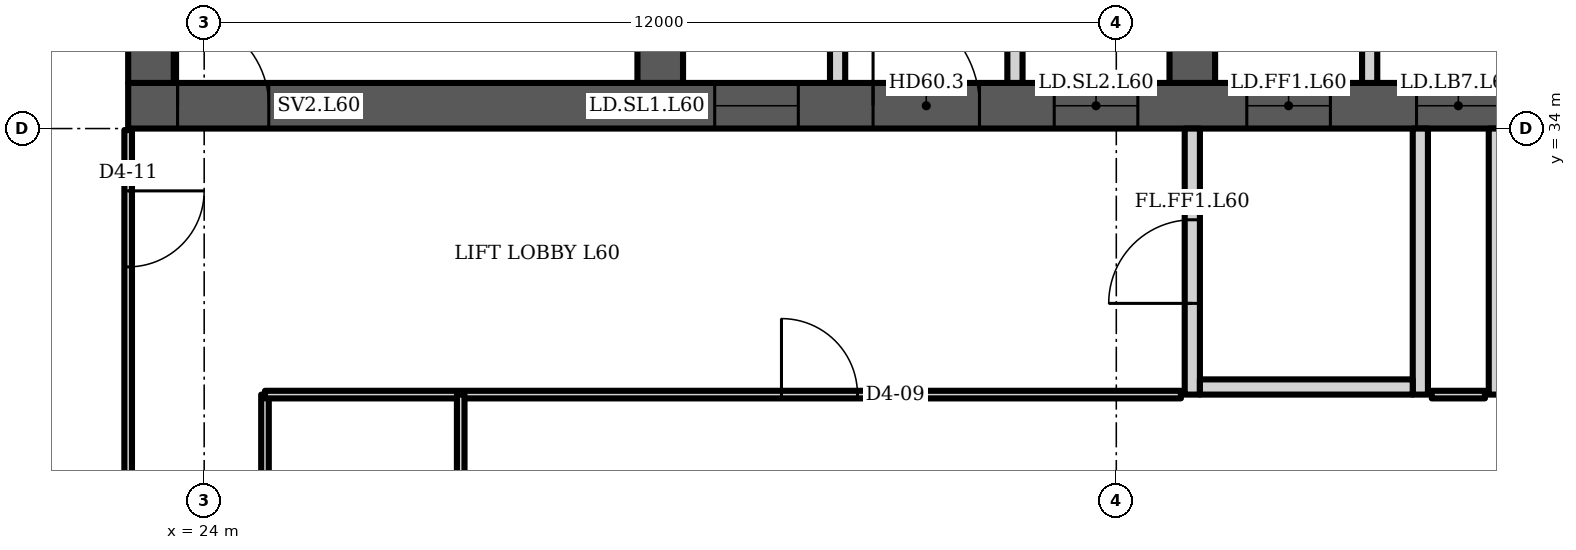
"""IFC4 building model, lengths in metres.
Left out: names, types, materials, properties, quantities, classifications, styles, units other than length and angle.
Written with IfcOpenShell. Run it as: python <this file> out.ifc"""

import sys

from ifc_helpers import new_model, si_unit, direction, frame, frame_2d, origin, place, context, subcontext, project, spatial, polyline, rectangle, outline, extrude, element, fill, save


model = new_model("IFC4")
c1 = context("Model", 3, precision=1e-05, world=origin(), true_north=direction((0.0, 1.0)))
c2 = subcontext(c1, "Body", "Model", "MODEL_VIEW")
j1 = project(units=[si_unit("LENGTHUNIT", "METRE"), si_unit("PLANEANGLEUNIT", "RADIAN")], contexts=[c1])
p1 = place(None, origin())
s1 = spatial("IfcSite", under=j1, at=p1, CompositionType="ELEMENT")
p2 = place(p1, origin())
s2 = spatial("IfcBuilding", under=s1, at=p2, CompositionType="ELEMENT")
p3 = place(p2, frame((0.0, 0.0, 239.5)))
s3 = spatial("IfcBuildingStorey", under=s2, at=p3, CompositionType="ELEMENT", Elevation=239.5)
p4 = place(p3, frame((23.0, 34.3, 0.0), z_axis=(0.0, 0.0, 1.0), x_axis=(1.0, 0.0, 0.0)))
e1 = element("IfcWall", 1, at=p4, inside=s3, PredefinedType="SHEAR", context=c2, shape_type="SweptSolid", body=[
    extrude(rectangle(XDim=35.0, YDim=0.6, at=frame_2d((17.5, 0.0))), origin(), (0.0, 0.0, 1.0), 3.6),
])
p5 = place(p4, frame((0.65, 0.0, 0.0)))
e2 = element("IfcOpeningElement", 2, at=p5, cuts=e1, PredefinedType="OPENING", context=c2, shape_type="SweptSolid", body=[
    extrude(rectangle(XDim=1.2, YDim=2.1, at=frame_2d((0.6, 1.05))), frame((0.0, 0.31, 0.0), z_axis=(0.0, -1.0, 0.0), x_axis=(1.0, 0.0, 0.0)), (0.0, 0.0, 1.0), 0.62),
])
p6 = place(p4, frame((7.717, 0.0, 0.0)))
e3 = element("IfcOpeningElement", 3, at=p6, cuts=e1, PredefinedType="OPENING", context=c2, shape_type="SweptSolid", body=[
    extrude(rectangle(XDim=1.1, YDim=2.1, at=frame_2d((0.55, 1.05))), frame((0.0, 0.31, 0.0), z_axis=(0.0, -1.0, 0.0), x_axis=(1.0, 0.0, 0.0)), (0.0, 0.0, 1.0), 0.62),
])
p7 = place(p4, frame((12.183, 0.0, 0.0)))
e4 = element("IfcOpeningElement", 4, at=p7, cuts=e1, PredefinedType="OPENING", context=c2, shape_type="SweptSolid", body=[
    extrude(rectangle(XDim=1.1, YDim=2.1, at=frame_2d((0.55, 1.05))), frame((0.0, 0.31, 0.0), z_axis=(0.0, -1.0, 0.0), x_axis=(1.0, 0.0, 0.0)), (0.0, 0.0, 1.0), 0.62),
])
p8 = place(p4, frame((9.8, 0.0, 0.0)))
e5 = element("IfcOpeningElement", 5, at=p8, cuts=e1, PredefinedType="OPENING", context=c2, shape_type="SweptSolid", body=[
    extrude(rectangle(XDim=1.4, YDim=2.1, at=frame_2d((0.7, 1.05))), frame((0.0, 0.31, 0.0), z_axis=(0.0, -1.0, 0.0), x_axis=(1.0, 0.0, 0.0)), (0.0, 0.0, 1.0), 0.62),
])
p9 = place(p4, frame((14.717, 0.0, 0.0)))
e6 = element("IfcOpeningElement", 6, at=p9, cuts=e1, PredefinedType="OPENING", context=c2, shape_type="SweptSolid", body=[
    extrude(rectangle(XDim=1.1, YDim=2.1, at=frame_2d((0.55, 1.05))), frame((0.0, 0.31, 0.0), z_axis=(0.0, -1.0, 0.0), x_axis=(1.0, 0.0, 0.0)), (0.0, 0.0, 1.0), 0.62),
])
p10 = place(p4, frame((16.95, 0.0, 0.0)))
e7 = element("IfcOpeningElement", 7, at=p10, cuts=e1, PredefinedType="OPENING", context=c2, shape_type="SweptSolid", body=[
    extrude(rectangle(XDim=1.1, YDim=2.1, at=frame_2d((0.55, 1.05))), frame((0.0, 0.31, 0.0), z_axis=(0.0, -1.0, 0.0), x_axis=(1.0, 0.0, 0.0)), (0.0, 0.0, 1.0), 0.62),
])
p11 = place(p4, frame((19.183, 0.0, 0.0)))
e8 = element("IfcOpeningElement", 8, at=p11, cuts=e1, PredefinedType="OPENING", context=c2, shape_type="SweptSolid", body=[
    extrude(rectangle(XDim=1.1, YDim=2.1, at=frame_2d((0.55, 1.05))), frame((0.0, 0.31, 0.0), z_axis=(0.0, -1.0, 0.0), x_axis=(1.0, 0.0, 0.0)), (0.0, 0.0, 1.0), 0.62),
])
p12 = place(p4, frame((26.15, 0.0, 0.0)))
e9 = element("IfcOpeningElement", 9, at=p12, cuts=e1, PredefinedType="OPENING", context=c2, shape_type="SweptSolid", body=[
    extrude(rectangle(XDim=1.2, YDim=2.1, at=frame_2d((0.6, 1.05))), frame((0.0, 0.31, 0.0), z_axis=(0.0, -1.0, 0.0), x_axis=(1.0, 0.0, 0.0)), (0.0, 0.0, 1.0), 0.62),
])
p13 = place(p4, frame((28.767, 0.0, 0.0)))
e10 = element("IfcOpeningElement", 10, at=p13, cuts=e1, PredefinedType="OPENING", context=c2, shape_type="SweptSolid", body=[
    extrude(rectangle(XDim=1.0, YDim=2.1, at=frame_2d((0.5, 1.05))), frame((0.0, 0.31, 0.0), z_axis=(0.0, -1.0, 0.0), x_axis=(1.0, 0.0, 0.0)), (0.0, 0.0, 1.0), 0.62),
])
p14 = place(p4, frame((33.083, 0.0, 0.0)))
e11 = element("IfcOpeningElement", 11, at=p14, cuts=e1, PredefinedType="OPENING", context=c2, shape_type="SweptSolid", body=[
    extrude(rectangle(XDim=1.0, YDim=2.1, at=frame_2d((0.5, 1.05))), frame((0.0, 0.31, 0.0), z_axis=(0.0, -1.0, 0.0), x_axis=(1.0, 0.0, 0.0)), (0.0, 0.0, 1.0), 0.62),
])
p15 = place(p4, frame((30.8, 0.0, 0.0)))
e12 = element("IfcOpeningElement", 12, at=p15, cuts=e1, PredefinedType="OPENING", context=c2, shape_type="SweptSolid", body=[
    extrude(rectangle(XDim=1.4, YDim=2.1, at=frame_2d((0.7, 1.05))), frame((0.0, 0.31, 0.0), z_axis=(0.0, -1.0, 0.0), x_axis=(1.0, 0.0, 0.0)), (0.0, 0.0, 1.0), 0.62),
])
p16 = place(p3, frame((23.3, 34.6, 0.0), z_axis=(0.0, 0.0, 1.0), x_axis=(0.0, 1.0, 0.0)))
e13 = element("IfcWall", 13, at=p16, inside=s3, PredefinedType="SHEAR", context=c2, shape_type="SweptSolid", body=[
    extrude(rectangle(XDim=13.585, YDim=0.6, at=frame_2d((6.792, 0.0))), origin(), (0.0, 0.0, 1.0), 3.6),
])
p17 = place(p3, frame((30.0, 34.6, 0.0), z_axis=(0.0, 0.0, 1.0), x_axis=(0.0, 1.0, 0.0)))
e14 = element("IfcWall", 14, at=p17, inside=s3, PredefinedType="SHEAR", context=c2, shape_type="SweptSolid", body=[
    extrude(rectangle(XDim=14.171, YDim=0.6, at=frame_2d((7.085, 0.0))), origin(), (0.0, 0.0, 1.0), 3.6),
])
p18 = place(p17, frame((3.8, 0.0, 0.0)))
e15 = element("IfcOpeningElement", 15, at=p18, cuts=e14, PredefinedType="OPENING", context=c2, shape_type="SweptSolid", body=[
    extrude(rectangle(XDim=1.1, YDim=2.1, at=frame_2d((0.55, 1.05))), frame((0.0, 0.31, 0.0), z_axis=(0.0, -1.0, 0.0), x_axis=(1.0, 0.0, 0.0)), (0.0, 0.0, 1.0), 0.62),
])
p19 = place(p3, frame((37.0, 34.6, 0.0), z_axis=(0.0, 0.0, 1.0), x_axis=(0.0, 1.0, 0.0)))
e16 = element("IfcWall", 16, at=p19, inside=s3, PredefinedType="SHEAR", context=c2, shape_type="SweptSolid", body=[
    extrude(rectangle(XDim=14.784, YDim=0.6, at=frame_2d((7.392, 0.0))), origin(), (0.0, 0.0, 1.0), 3.6),
])
p20 = place(p19, frame((11.302, 0.0, 0.0)))
e17 = element("IfcOpeningElement", 17, at=p20, cuts=e16, PredefinedType="OPENING", context=c2, shape_type="SweptSolid", body=[
    extrude(rectangle(XDim=1.0, YDim=2.1, at=frame_2d((0.5, 1.05))), frame((0.0, 0.31, 0.0), z_axis=(0.0, -1.0, 0.0), x_axis=(1.0, 0.0, 0.0)), (0.0, 0.0, 1.0), 0.62),
])
p21 = place(p19, frame((3.8, 0.0, 0.0)))
e18 = element("IfcOpeningElement", 18, at=p21, cuts=e16, PredefinedType="OPENING", context=c2, shape_type="SweptSolid", body=[
    extrude(rectangle(XDim=1.1, YDim=2.1, at=frame_2d((0.55, 1.05))), frame((0.0, 0.31, 0.0), z_axis=(0.0, -1.0, 0.0), x_axis=(1.0, 0.0, 0.0)), (0.0, 0.0, 1.0), 0.62),
])
p22 = place(p3, frame((0.0, 0.0, -0.0)))
e19 = element("IfcWall", 19, at=p22, inside=s3, PredefinedType="PARTITIONING", context=c2, shape_type="SweptSolid", body=[
    extrude(outline(polyline([(32.233, 37.45), (30.3, 37.45), (30.3, 37.65), (32.233, 37.65), (32.433, 37.65), (32.433, 34.6), (32.233, 34.6), (32.233, 37.45)])), origin(), (0.0, 0.0, 1.0), 3.2),
])
p23 = place(p3, frame((0.0, 0.0, -0.0)))
e20 = element("IfcWall", 20, at=p23, inside=s3, PredefinedType="PARTITIONING", context=c2, shape_type="SweptSolid", body=[
    extrude(outline(polyline([(34.567, 37.65), (34.767, 37.65), (36.7, 37.65), (36.7, 37.45), (34.767, 37.45), (34.767, 34.6), (34.567, 34.6), (34.567, 37.65)])), origin(), (0.0, 0.0, 1.0), 3.2),
])
p24 = place(p3, frame((0.0, 0.0, -0.0)))
e21 = element("IfcWall", 21, at=p24, inside=s3, PredefinedType="PARTITIONING", context=c2, shape_type="SweptSolid", body=[
    extrude(outline(polyline([(41.567, 37.1), (39.433, 37.1), (39.433, 34.6), (39.233, 34.6), (39.233, 37.45), (37.3, 37.45), (37.3, 37.65), (39.233, 37.65), (39.433, 37.65), (39.433, 37.3), (41.567, 37.3), (41.567, 37.35), (41.767, 37.35), (43.7, 37.35), (43.7, 37.15), (41.767, 37.15), (41.767, 34.6), (41.567, 34.6), (41.567, 37.1)])), origin(), (0.0, 0.0, 1.0), 3.2),
])
p25 = place(p3, frame((37.0, 30.5, 0.0), z_axis=(0.0, 0.0, 1.0), x_axis=(0.0, 1.0, 0.0)))
e22 = element("IfcWall", 22, at=p25, inside=s3, PredefinedType="PARTITIONING", context=c2, shape_type="SweptSolid", body=[
    extrude(rectangle(XDim=3.5, YDim=0.2, at=frame_2d((1.75, 0.0))), origin(), (0.0, 0.0, 1.0), 3.2),
])
p26 = place(p25, frame((1.2, 0.0, 0.0)))
e23 = element("IfcOpeningElement", 23, at=p26, cuts=e22, PredefinedType="OPENING", context=c2, shape_type="SweptSolid", body=[
    extrude(rectangle(XDim=1.1, YDim=2.1, at=frame_2d((0.55, 1.05))), frame((0.0, 0.11, 0.0), z_axis=(0.0, -1.0, 0.0), x_axis=(1.0, 0.0, 0.0)), (0.0, 0.0, 1.0), 0.22),
])
p27 = place(p3, frame((40.0, 30.5, 0.0), z_axis=(0.0, 0.0, 1.0), x_axis=(0.0, 1.0, 0.0)))
e24 = element("IfcWall", 24, at=p27, inside=s3, PredefinedType="PARTITIONING", context=c2, shape_type="SweptSolid", body=[
    extrude(rectangle(XDim=3.5, YDim=0.2, at=frame_2d((1.75, 0.0))), origin(), (0.0, 0.0, 1.0), 3.2),
])
p28 = place(p3, frame((37.1, 30.6, 0.0), z_axis=(0.0, 0.0, 1.0), x_axis=(1.0, 0.0, 0.0)))
e25 = element("IfcWall", 25, at=p28, inside=s3, PredefinedType="PARTITIONING", context=c2, shape_type="SweptSolid", body=[
    extrude(rectangle(XDim=2.8, YDim=0.2, at=frame_2d((1.4, 0.0))), origin(), (0.0, 0.0, 1.0), 3.2),
])
p29 = place(p3, frame((41.0, 30.5, 0.0), z_axis=(0.0, 0.0, 1.0), x_axis=(0.0, 1.0, 0.0)))
e26 = element("IfcWall", 26, at=p29, inside=s3, PredefinedType="PARTITIONING", context=c2, shape_type="SweptSolid", body=[
    extrude(rectangle(XDim=3.5, YDim=0.2, at=frame_2d((1.75, 0.0))), origin(), (0.0, 0.0, 1.0), 3.2),
])
p30 = place(p3, frame((23.0, 24.275, 0.0), z_axis=(0.0, 0.0, 1.0), x_axis=(0.0, 1.0, 0.0)))
e27 = element("IfcWall", 27, at=p30, inside=s3, PredefinedType="PARTITIONING", context=c2, shape_type="SweptSolid", body=[
    extrude(rectangle(XDim=9.705, YDim=0.1, at=frame_2d((4.853, 0.0))), origin(), (0.0, 0.0, 1.0), 3.2),
])
p31 = place(p30, frame((7.905, 0.0, 0.0)))
e28 = element("IfcOpeningElement", 28, at=p31, cuts=e27, PredefinedType="OPENING", context=c2, shape_type="SweptSolid", body=[
    extrude(rectangle(XDim=1.0, YDim=2.1, at=frame_2d((0.5, 1.05))), frame((0.0, 0.06, 0.0), z_axis=(0.0, -1.0, 0.0), x_axis=(1.0, 0.0, 0.0)), (0.0, 0.0, 1.0), 0.12),
])
p32 = place(p3, frame((24.8, 25.05, 0.0), z_axis=(0.0, 0.0, 1.0), x_axis=(0.0, 1.0, 0.0)))
e29 = element("IfcWall", 29, at=p32, inside=s3, PredefinedType="PARTITIONING", context=c2, shape_type="SweptSolid", body=[
    extrude(rectangle(XDim=5.45, YDim=0.1, at=frame_2d((2.725, 0.0))), origin(), (0.0, 0.0, 1.0), 3.2),
])
p33 = place(p32, frame((1.537, 0.0, 0.0)))
e30 = element("IfcOpeningElement", 30, at=p33, cuts=e29, PredefinedType="OPENING", context=c2, shape_type="SweptSolid", body=[
    extrude(rectangle(XDim=1.0, YDim=2.1, at=frame_2d((0.5, 1.05))), frame((0.0, 0.06, 0.0), z_axis=(0.0, -1.0, 0.0), x_axis=(1.0, 0.0, 0.0)), (0.0, 0.0, 1.0), 0.12),
])
p34 = place(p3, frame((24.8, 30.5, 0.0), z_axis=(0.0, 0.0, 1.0), x_axis=(1.0, 0.0, 0.0)))
e31 = element("IfcWall", 31, at=p34, inside=s3, PredefinedType="PARTITIONING", context=c2, shape_type="SweptSolid", body=[
    extrude(rectangle(XDim=12.05, YDim=0.1, at=frame_2d((6.025, 0.0))), origin(), (0.0, 0.0, 1.0), 3.2),
])
p35 = place(p34, frame((6.795, 0.0, 0.0)))
e32 = element("IfcOpeningElement", 32, at=p35, cuts=e31, PredefinedType="OPENING", context=c2, shape_type="SweptSolid", body=[
    extrude(rectangle(XDim=1.0, YDim=2.1, at=frame_2d((0.5, 1.05))), frame((0.0, 0.06, 0.0), z_axis=(0.0, -1.0, 0.0), x_axis=(1.0, 0.0, 0.0)), (0.0, 0.0, 1.0), 0.12),
])
p36 = place(p3, frame((27.375, 5.915, 0.0), z_axis=(0.0, 0.0, 1.0), x_axis=(0.0, 1.0, 0.0)))
e33 = element("IfcWall", 33, at=p36, inside=s3, PredefinedType="PARTITIONING", context=c2, shape_type="SweptSolid", body=[
    extrude(rectangle(XDim=24.585, YDim=0.1, at=frame_2d((12.292, 0.0))), origin(), (0.0, 0.0, 1.0), 3.2),
])
p37 = place(p3, frame((40.15, 30.5, 0.0), z_axis=(0.0, 0.0, 1.0), x_axis=(1.0, 0.0, 0.0)))
e34 = element("IfcWall", 34, at=p37, inside=s3, PredefinedType="PARTITIONING", context=c2, shape_type="SweptSolid", body=[
    extrude(rectangle(XDim=0.7, YDim=0.1, at=frame_2d((0.35, 0.0))), origin(), (0.0, 0.0, 1.0), 3.2),
])
p38 = place(p5, origin())
e35 = element("IfcDoor", 35, at=p38, inside=s3, OperationType="SINGLE_SWING_LEFT", PredefinedType="DOOR", context=c2, shape_type="SweptSolid", body=[
    extrude(rectangle(XDim=1.2, YDim=2.1, at=frame_2d((0.6, 1.05))), frame((0.0, 0.025, 0.0), z_axis=(0.0, -1.0, 0.0), x_axis=(1.0, 0.0, 0.0)), (0.0, 0.0, 1.0), 0.05),
])
fill(e2, e35)
p39 = place(p6, origin())
e36 = element("IfcDoor", 36, at=p39, inside=s3, OperationType="DOUBLE_DOOR_SLIDING", PredefinedType="DOOR", context=c2, shape_type="SweptSolid", body=[
    extrude(rectangle(XDim=1.1, YDim=2.1, at=frame_2d((0.55, 1.05))), frame((0.0, 0.025, 0.0), z_axis=(0.0, -1.0, 0.0), x_axis=(1.0, 0.0, 0.0)), (0.0, 0.0, 1.0), 0.05),
])
fill(e3, e36)
p40 = place(p7, origin())
e37 = element("IfcDoor", 37, at=p40, inside=s3, OperationType="DOUBLE_DOOR_SLIDING", PredefinedType="DOOR", context=c2, shape_type="SweptSolid", body=[
    extrude(rectangle(XDim=1.1, YDim=2.1, at=frame_2d((0.55, 1.05))), frame((0.0, 0.025, 0.0), z_axis=(0.0, -1.0, 0.0), x_axis=(1.0, 0.0, 0.0)), (0.0, 0.0, 1.0), 0.05),
])
fill(e4, e37)
p41 = place(p8, origin())
e38 = element("IfcDoor", 38, at=p41, inside=s3, OperationType="DOUBLE_DOOR_SINGLE_SWING", PredefinedType="DOOR", context=c2, shape_type="SweptSolid", body=[
    extrude(rectangle(XDim=1.4, YDim=2.1, at=frame_2d((0.7, 1.05))), frame((0.0, 0.025, 0.0), z_axis=(0.0, -1.0, 0.0), x_axis=(1.0, 0.0, 0.0)), (0.0, 0.0, 1.0), 0.05),
])
fill(e5, e38)
p42 = place(p9, origin())
e39 = element("IfcDoor", 39, at=p42, inside=s3, OperationType="DOUBLE_DOOR_SLIDING", PredefinedType="DOOR", context=c2, shape_type="SweptSolid", body=[
    extrude(rectangle(XDim=1.1, YDim=2.1, at=frame_2d((0.55, 1.05))), frame((0.0, 0.025, 0.0), z_axis=(0.0, -1.0, 0.0), x_axis=(1.0, 0.0, 0.0)), (0.0, 0.0, 1.0), 0.05),
])
fill(e6, e39)
p43 = place(p10, origin())
e40 = element("IfcDoor", 40, at=p43, inside=s3, OperationType="DOUBLE_DOOR_SLIDING", PredefinedType="DOOR", context=c2, shape_type="SweptSolid", body=[
    extrude(rectangle(XDim=1.1, YDim=2.1, at=frame_2d((0.55, 1.05))), frame((0.0, 0.025, 0.0), z_axis=(0.0, -1.0, 0.0), x_axis=(1.0, 0.0, 0.0)), (0.0, 0.0, 1.0), 0.05),
])
fill(e7, e40)
p44 = place(p26, origin())
e41 = element("IfcDoor", 41, at=p44, inside=s3, OperationType="SINGLE_SWING_LEFT", PredefinedType="DOOR", context=c2, shape_type="SweptSolid", body=[
    extrude(rectangle(XDim=1.1, YDim=2.1, at=frame_2d((0.55, 1.05))), frame((0.0, 0.025, 0.0), z_axis=(0.0, -1.0, 0.0), x_axis=(1.0, 0.0, 0.0)), (0.0, 0.0, 1.0), 0.05),
])
fill(e23, e41)
p45 = place(p35, origin())
e42 = element("IfcDoor", 42, at=p45, inside=s3, OperationType="SINGLE_SWING_LEFT", PredefinedType="DOOR", context=c2, shape_type="SweptSolid", body=[
    extrude(rectangle(XDim=1.0, YDim=2.1, at=frame_2d((0.5, 1.05))), frame((0.0, 0.025, 0.0), z_axis=(0.0, -1.0, 0.0), x_axis=(1.0, 0.0, 0.0)), (0.0, 0.0, 1.0), 0.05),
])
fill(e32, e42)
p46 = place(p31, origin())
e43 = element("IfcDoor", 43, at=p46, inside=s3, OperationType="SINGLE_SWING_RIGHT", PredefinedType="DOOR", context=c2, shape_type="SweptSolid", body=[
    extrude(rectangle(XDim=1.0, YDim=2.1, at=frame_2d((0.5, 1.05))), frame((0.0, 0.025, 0.0), z_axis=(0.0, -1.0, 0.0), x_axis=(1.0, 0.0, 0.0)), (0.0, 0.0, 1.0), 0.05),
])
fill(e28, e43)
save(model, sys.argv[1])
